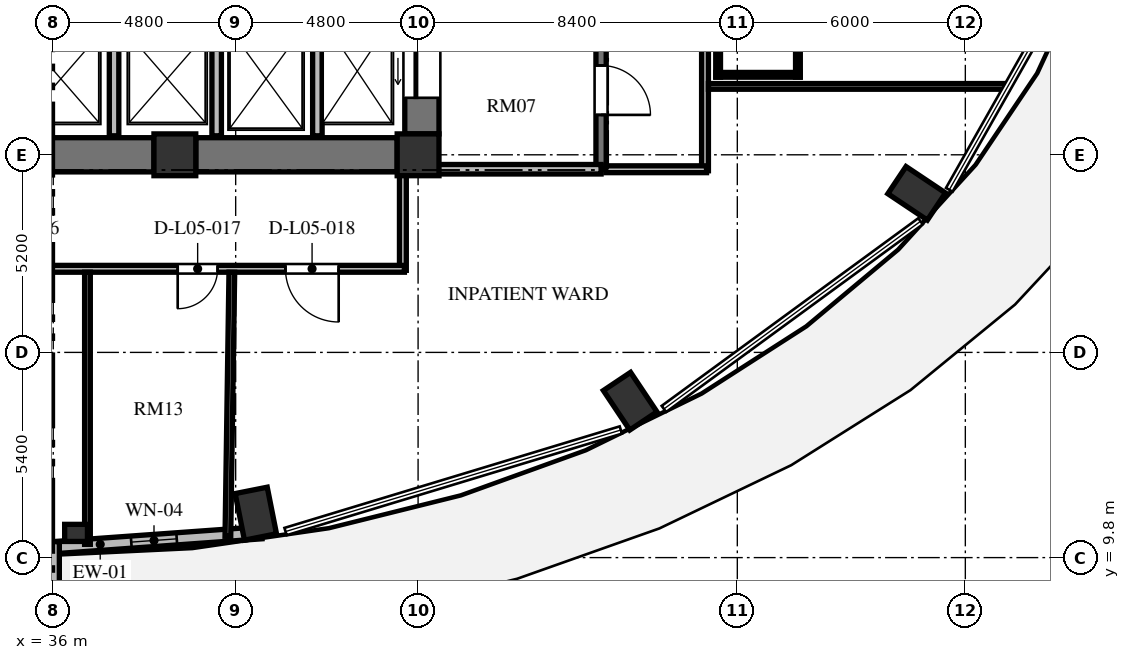
"""IFC4 building model, lengths in metres.
Left out: names, types, materials, properties, quantities, classifications, styles, units other than length and angle.
Written with IfcOpenShell. Run it as: python <this file> out.ifc"""

import sys

from ifc_helpers import new_model, si_unit, direction, frame, frame_2d, origin, origin_2d, place, context, subcontext, project, spatial, rectangle, extrude, element, fill, save


model = new_model("IFC4")
c1 = context("Model", 3, precision=1e-05, world=origin(), true_north=direction((0.0, 1.0)))
c2 = subcontext(c1, "Body", "Model", "MODEL_VIEW")
j1 = project(units=[si_unit("LENGTHUNIT", "METRE"), si_unit("PLANEANGLEUNIT", "RADIAN")], contexts=[c1])
p1 = place(None, origin())
s1 = spatial("IfcSite", under=j1, at=p1, CompositionType="ELEMENT")
p2 = place(p1, origin())
s2 = spatial("IfcBuilding", under=s1, at=p2, CompositionType="ELEMENT")
p3 = place(p2, frame((0.0, 0.0, 25.2)))
s3 = spatial("IfcBuildingStorey", under=s2, at=p3, CompositionType="ELEMENT", Elevation=25.2)
for number, where, z_axis, x_axis in (
    (1, (41.331, 10.956, 0.0), (0.0, 0.0, 1.0), (0.195, -0.981, 0.0)),
    (2, (51.181, 13.916, 0.0), (0.0, 0.0, 1.0), (0.556, -0.831, 0.0)),
    (3, (58.72, 19.386, 0.0), (0.0, 0.0, 1.0), (0.831, -0.556, 0.0)),
):
    element("IfcColumn", number, at=place(p3, frame(where, z_axis=z_axis, x_axis=x_axis)), inside=s3, PredefinedType="COLUMN", context=c2, shape_type="SweptSolid", body=[
        extrude(rectangle(XDim=1.25, YDim=0.86, at=origin_2d()), origin(), (0.0, 0.0, 1.0), 3.648),
    ])
for number, where, z_axis, x_axis in (
    (4, (39.2, 20.4, 0.0), (0.0, 0.0, 1.0), (1.0, 0.0, 0.0)),
    (5, (45.6, 20.4, 0.0), (0.0, 0.0, 1.0), (1.0, 0.0, 0.0)),
):
    element("IfcColumn", number, at=place(p3, frame(where, z_axis=z_axis, x_axis=x_axis)), inside=s3, PredefinedType="COLUMN", context=c2, shape_type="SweptSolid", body=[
        extrude(rectangle(XDim=1.1, YDim=1.1, at=origin_2d()), origin(), (0.0, 0.0, 1.0), 3.648),
    ])
p4 = place(p3, frame((36.6, 10.45, 0.0), z_axis=(0.0, 0.0, 1.0), x_axis=(1.0, 0.0, 0.0)))
e6 = element("IfcColumn", 6, at=p4, inside=s3, PredefinedType="PILASTER", context=c2, shape_type="SweptSolid", body=[
    extrude(rectangle(XDim=0.6, YDim=0.45, at=origin_2d()), origin(), (0.0, 0.0, 1.0), 3.648),
])
p5 = place(p3, frame((45.7, 20.95, 0.0), z_axis=(0.0, 0.0, 1.0), x_axis=(0.0, 1.0, 0.0)))
e7 = element("IfcWall", 7, at=p5, inside=s3, PredefinedType="SHEAR", context=c2, shape_type="SweptSolid", body=[
    extrude(rectangle(XDim=14.1, YDim=0.9, at=frame_2d((7.05, 0.0))), origin(), (0.0, 0.0, 1.0), 3.648),
])
p6 = place(p5, frame((11.75, 0.0, 0.0)))
e8 = element("IfcOpeningElement", 8, at=p6, cuts=e7, PredefinedType="OPENING", context=c2, shape_type="SweptSolid", body=[
    extrude(rectangle(XDim=1.4, YDim=2.3, at=frame_2d((0.7, 1.15))), frame((0.0, 0.46, 0.0), z_axis=(0.0, -1.0, 0.0), x_axis=(1.0, 0.0, 0.0)), (0.0, 0.0, 1.0), 0.92),
])
p7 = place(p5, frame((0.95, 0.0, 0.0)))
e9 = element("IfcOpeningElement", 9, at=p7, cuts=e7, PredefinedType="OPENING", context=c2, shape_type="SweptSolid", body=[
    extrude(rectangle(XDim=1.4, YDim=2.3, at=frame_2d((0.7, 1.15))), frame((0.0, 0.46, 0.0), z_axis=(0.0, -1.0, 0.0), x_axis=(1.0, 0.0, 0.0)), (0.0, 0.0, 1.0), 0.92),
])
p8 = place(p3, frame((33.35, 20.4, 0.0), z_axis=(0.0, 0.0, 1.0), x_axis=(1.0, 0.0, 0.0)))
e10 = element("IfcWall", 10, at=p8, inside=s3, PredefinedType="SHEAR", context=c2, shape_type="SweptSolid", body=[
    extrude(rectangle(XDim=5.3, YDim=0.9, at=frame_2d((2.65, 0.0))), origin(), (0.0, 0.0, 1.0), 3.648),
])
p9 = place(p3, frame((39.75, 20.4, 0.0), z_axis=(0.0, 0.0, 1.0), x_axis=(1.0, 0.0, 0.0)))
e11 = element("IfcWall", 11, at=p9, inside=s3, PredefinedType="SHEAR", context=c2, shape_type="SweptSolid", body=[
    extrude(rectangle(XDim=5.3, YDim=0.9, at=frame_2d((2.65, 0.0))), origin(), (0.0, 0.0, 1.0), 3.648),
])
p10 = place(p3, frame((35.821, 10.047, 0.0), z_axis=(0.0, 0.0, 1.0), x_axis=(0.997422321809, 0.071754525696, 0.0)))
e12 = element("IfcWall", 12, at=p10, inside=s3, PredefinedType="SOLIDWALL", context=c2, shape_type="SweptSolid", body=[
    extrude(rectangle(XDim=5.675, YDim=0.32, at=frame_2d((2.838, 0.0))), origin(), (0.0, 0.0, 1.0), 3.428),
])
p11 = place(p10, frame((2.238, 0.0, 0.85)))
e13 = element("IfcOpeningElement", 13, at=p11, cuts=e12, PredefinedType="OPENING", context=c2, shape_type="SweptSolid", body=[
    extrude(rectangle(XDim=1.2, YDim=1.8, at=frame_2d((0.6, 0.9))), frame((0.0, 0.17, 0.0), z_axis=(0.0, -1.0, 0.0), x_axis=(1.0, 0.0, 0.0)), (0.0, 0.0, 1.0), 0.34),
])
p12 = place(p3, frame((36.0, 5.1, 0.0), z_axis=(0.0, 0.0, 1.0), x_axis=(0.0, 1.0, 0.0)))
e14 = element("IfcWall", 14, at=p12, inside=s3, PredefinedType="SOLIDWALL", context=c2, shape_type="SweptSolid", body=[
    extrude(rectangle(XDim=5.12, YDim=0.32, at=frame_2d((2.56, 0.0))), origin(), (0.0, 0.0, 1.0), 3.428),
])
p13 = place(p12, frame((1.36, 0.0, 0.84)))
e15 = element("IfcOpeningElement", 15, at=p13, cuts=e14, PredefinedType="OPENING", context=c2, shape_type="SweptSolid", body=[
    extrude(rectangle(XDim=2.4, YDim=2.04, at=frame_2d((1.2, 1.02))), frame((0.0, 0.17, 0.0), z_axis=(0.0, -1.0, 0.0), x_axis=(1.0, 0.0, 0.0)), (0.0, 0.0, 1.0), 0.34),
])
p14 = place(p3, frame((42.95, 20.9, 0.0), z_axis=(0.0, 0.0, 1.0), x_axis=(0.0, 1.0, 0.0)))
e16 = element("IfcWall", 16, at=p14, inside=s3, PredefinedType="SOLIDWALL", context=c2, shape_type="SweptSolid", body=[
    extrude(rectangle(XDim=3.2, YDim=0.25, at=frame_2d((1.6, 0.0))), origin(), (0.0, 0.0, 1.0), 3.428),
])
for number, where, z_axis, x_axis in (
    (17, (37.6, 20.9, 0.0), (0.0, 0.0, 1.0), (0.0, 1.0, 0.0)),
    (18, (40.3, 20.9, 0.0), (0.0, 0.0, 1.0), (0.0, 1.0, 0.0)),
):
    element("IfcWall", number, at=place(p3, frame(where, z_axis=z_axis, x_axis=x_axis)), inside=s3, PredefinedType="SOLIDWALL", context=c2, shape_type="SweptSolid", body=[
        extrude(rectangle(XDim=2.8, YDim=0.25, at=frame_2d((1.4, 0.0))), origin(), (0.0, 0.0, 1.0), 3.428),
    ])
p15 = place(p3, frame((50.415, 35.845, 0.0), z_axis=(0.0, 0.0, 1.0), x_axis=(0.0, -1.0, 0.0)))
e19 = element("IfcWall", 19, at=p15, inside=s3, PredefinedType="SHEAR", context=c2, shape_type="SweptSolid", body=[
    extrude(rectangle(XDim=15.825, YDim=0.27, at=frame_2d((7.913, 0.0))), origin(), (0.0, 0.0, 1.0), 3.648),
])
p16 = place(p15, frame((4.445, 0.0, 0.0)))
e20 = element("IfcOpeningElement", 20, at=p16, cuts=e19, PredefinedType="OPENING", context=c2, shape_type="SweptSolid", body=[
    extrude(rectangle(XDim=1.2, YDim=2.15, at=frame_2d((0.6, 1.075))), frame((0.0, 0.145, 0.0), z_axis=(0.0, -1.0, 0.0), x_axis=(1.0, 0.0, 0.0)), (0.0, 0.0, 1.0), 0.29),
])
p17 = place(p15, frame((1.295, 0.0, 0.0)))
e21 = element("IfcOpeningElement", 21, at=p17, cuts=e19, PredefinedType="OPENING", context=c2, shape_type="SweptSolid", body=[
    extrude(rectangle(XDim=1.3, YDim=2.2, at=frame_2d((0.65, 1.1))), frame((0.0, 0.145, 0.0), z_axis=(0.0, -1.0, 0.0), x_axis=(1.0, 0.0, 0.0)), (0.0, 0.0, 1.0), 0.29),
])
p18 = place(p15, frame((13.095, 0.0, 0.0)))
e22 = element("IfcOpeningElement", 22, at=p18, cuts=e19, PredefinedType="OPENING", context=c2, shape_type="SweptSolid", body=[
    extrude(rectangle(XDim=1.3, YDim=2.2, at=frame_2d((0.65, 1.1))), frame((0.0, 0.145, 0.0), z_axis=(0.0, -1.0, 0.0), x_axis=(1.0, 0.0, 0.0)), (0.0, 0.0, 1.0), 0.29),
])
p19 = place(p3, frame((45.7, 20.02, 0.0), z_axis=(0.0, 0.0, 1.0), x_axis=(1.0, 0.0, 0.0)))
e23 = element("IfcWall", 23, at=p19, inside=s3, PredefinedType="SOLIDWALL", context=c2, shape_type="SweptSolid", body=[
    extrude(rectangle(XDim=4.715, YDim=0.25, at=frame_2d((2.357, 0.0))), origin(), (0.0, 0.0, 1.0), 2.813),
])
p20 = place(p3, frame((53.15, 26.64, 0.0), z_axis=(0.0, 0.0, 1.0), x_axis=(0.0, -1.0, 0.0)))
e24 = element("IfcWall", 24, at=p20, inside=s3, PredefinedType="PARTITIONING", context=c2, shape_type="SweptSolid", body=[
    extrude(rectangle(XDim=6.66, YDim=0.18, at=frame_2d((3.33, 0.0))), origin(), (0.0, 0.0, 1.0), 3.428),
])
p21 = place(p3, frame((53.19, 20.02, 0.0), z_axis=(0.0, 0.0, 1.0), x_axis=(-1.0, 0.0, 0.0)))
e25 = element("IfcWall", 25, at=p21, inside=s3, PredefinedType="PARTITIONING", context=c2, shape_type="SweptSolid", body=[
    extrude(rectangle(XDim=2.65, YDim=0.18, at=frame_2d((1.325, 0.0))), origin(), (0.0, 0.0, 1.0), 2.813),
])
p22 = place(p3, frame((45.2, 19.91, 0.0), z_axis=(0.0, 0.0, 1.0), x_axis=(0.0, -1.0, 0.0)))
e26 = element("IfcWall", 26, at=p22, inside=s3, PredefinedType="PARTITIONING", context=c2, shape_type="SweptSolid", body=[
    extrude(rectangle(XDim=2.55, YDim=0.18, at=frame_2d((1.275, 0.0))), origin(), (0.0, 0.0, 1.0), 3.428),
])
p23 = place(p3, frame((45.24, 17.4, 0.0), z_axis=(0.0, 0.0, 1.0), x_axis=(-1.0, 0.0, 0.0)))
e27 = element("IfcWall", 27, at=p23, inside=s3, PredefinedType="PARTITIONING", context=c2, shape_type="SweptSolid", body=[
    extrude(rectangle(XDim=21.93, YDim=0.18, at=frame_2d((10.965, 0.0))), origin(), (0.0, 0.0, 1.0), 3.053),
])
p24 = place(p23, frame((18.076, 0.0, 0.0)))
e28 = element("IfcOpeningElement", 28, at=p24, cuts=e27, PredefinedType="OPENING", context=c2, shape_type="SweptSolid", body=[
    extrude(rectangle(XDim=1.4, YDim=2.2, at=frame_2d((0.7, 1.1))), frame((0.0, 0.1, 0.0), z_axis=(0.0, -1.0, 0.0), x_axis=(1.0, 0.0, 0.0)), (0.0, 0.0, 1.0), 0.2),
])
p25 = place(p23, frame((13.34, 0.0, 0.0)))
e29 = element("IfcOpeningElement", 29, at=p25, cuts=e27, PredefinedType="OPENING", context=c2, shape_type="SweptSolid", body=[
    extrude(rectangle(XDim=1.4, YDim=2.2, at=frame_2d((0.7, 1.1))), frame((0.0, 0.1, 0.0), z_axis=(0.0, -1.0, 0.0), x_axis=(1.0, 0.0, 0.0)), (0.0, 0.0, 1.0), 0.2),
])
p26 = place(p23, frame((9.715, 0.0, 0.0)))
e30 = element("IfcOpeningElement", 30, at=p26, cuts=e27, PredefinedType="OPENING", context=c2, shape_type="SweptSolid", body=[
    extrude(rectangle(XDim=1.05, YDim=2.15, at=frame_2d((0.525, 1.075))), frame((0.0, 0.1, 0.0), z_axis=(0.0, -1.0, 0.0), x_axis=(1.0, 0.0, 0.0)), (0.0, 0.0, 1.0), 0.2),
])
p27 = place(p23, frame((4.916, 0.0, 0.0)))
e31 = element("IfcOpeningElement", 31, at=p27, cuts=e27, PredefinedType="OPENING", context=c2, shape_type="SweptSolid", body=[
    extrude(rectangle(XDim=1.05, YDim=2.15, at=frame_2d((0.525, 1.075))), frame((0.0, 0.1, 0.0), z_axis=(0.0, -1.0, 0.0), x_axis=(1.0, 0.0, 0.0)), (0.0, 0.0, 1.0), 0.2),
])
p28 = place(p23, frame((1.729, 0.0, 0.0)))
e32 = element("IfcOpeningElement", 32, at=p28, cuts=e27, PredefinedType="OPENING", context=c2, shape_type="SweptSolid", body=[
    extrude(rectangle(XDim=1.4, YDim=2.2, at=frame_2d((0.7, 1.1))), frame((0.0, 0.1, 0.0), z_axis=(0.0, -1.0, 0.0), x_axis=(1.0, 0.0, 0.0)), (0.0, 0.0, 1.0), 0.2),
])
p29 = place(p3, frame((53.24, 22.2, 0.0), z_axis=(0.0, 0.0, 1.0), x_axis=(1.0, 0.0, 0.0)))
e33 = element("IfcWall", 33, at=p29, inside=s3, PredefinedType="PARTITIONING", context=c2, shape_type="SweptSolid", body=[
    extrude(rectangle(XDim=7.875, YDim=0.15, at=frame_2d((3.938, 0.0))), origin(), (0.0, 0.0, 1.0), 3.428),
])
p30 = place(p3, frame((36.9, 10.15, 0.0), z_axis=(0.0, 0.0, 1.0), x_axis=(0.0, 1.0, 0.0)))
e34 = element("IfcWall", 34, at=p30, inside=s3, PredefinedType="PARTITIONING", context=c2, shape_type="SweptSolid", body=[
    extrude(rectangle(XDim=7.16, YDim=0.15, at=frame_2d((3.58, 0.0))), origin(), (0.0, 0.0, 1.0), 3.428),
])
p31 = place(p3, frame((40.595, 10.359, 0.0), z_axis=(0.0, 0.0, 1.0), x_axis=(0.014960393547, 0.99988808705, 0.0)))
e35 = element("IfcWall", 35, at=p31, inside=s3, PredefinedType="PARTITIONING", context=c2, shape_type="SweptSolid", body=[
    extrude(rectangle(XDim=6.952, YDim=0.15, at=frame_2d((3.476, 0.0))), origin(), (0.0, 0.0, 1.0), 2.813),
])
p32 = place(p3, frame((53.435, 22.505, 0.0), z_axis=(0.0, 0.0, 1.0), x_axis=(1.0, 0.0, 0.0)))
e36 = element("IfcWall", 36, at=p32, inside=s3, PredefinedType="PARTITIONING", context=c2, shape_type="SweptSolid", body=[
    extrude(rectangle(XDim=2.22, YDim=0.125, at=frame_2d((1.11, 0.0))), origin(), (0.0, 0.0, 1.0), 3.428),
])
for number, where, z_axis, x_axis in (
    (37, (55.595, 22.445, 0.0), (0.0, 0.0, 1.0), (0.0, 1.0, 0.0)),
    (38, (53.495, 22.445, 0.0), (0.0, 0.0, 1.0), (0.0, 1.0, 0.0)),
):
    element("IfcWall", number, at=place(p3, frame(where, z_axis=z_axis, x_axis=x_axis)), inside=s3, PredefinedType="PARTITIONING", context=c2, shape_type="SweptSolid", body=[
        extrude(rectangle(XDim=2.28, YDim=0.125, at=frame_2d((1.14, 0.0))), origin(), (0.0, 0.0, 1.0), 3.428),
    ])
p33 = place(p11, origin())
e39 = element("IfcWindow", 39, at=p33, inside=s3, PartitioningType="SINGLE_PANEL", PredefinedType="WINDOW", context=c2, shape_type="SweptSolid", body=[
    extrude(rectangle(XDim=1.2, YDim=1.8, at=frame_2d((0.6, 0.9))), frame((0.0, 0.03, 0.0), z_axis=(0.0, -1.0, 0.0), x_axis=(1.0, 0.0, 0.0)), (0.0, 0.0, 1.0), 0.06),
])
fill(e13, e39)
p34 = place(p7, origin())
e40 = element("IfcDoor", 40, at=p34, inside=s3, OperationType="SLIDING_TO_LEFT", PredefinedType="DOOR", context=c2, shape_type="SweptSolid", body=[
    extrude(rectangle(XDim=1.4, YDim=2.3, at=frame_2d((0.7, 1.15))), frame((0.0, 0.025, 0.0), z_axis=(0.0, -1.0, 0.0), x_axis=(1.0, 0.0, 0.0)), (0.0, 0.0, 1.0), 0.05),
])
fill(e9, e40)
p35 = place(p18, origin())
e41 = element("IfcDoor", 41, at=p35, inside=s3, OperationType="SINGLE_SWING_RIGHT", PredefinedType="DOOR", context=c2, shape_type="SweptSolid", body=[
    extrude(rectangle(XDim=1.3, YDim=2.2, at=frame_2d((0.65, 1.1))), frame((0.0, 0.025, 0.0), z_axis=(0.0, -1.0, 0.0), x_axis=(1.0, 0.0, 0.0)), (0.0, 0.0, 1.0), 0.05),
])
fill(e22, e41)
p36 = place(p27, origin())
e42 = element("IfcDoor", 42, at=p36, inside=s3, OperationType="SINGLE_SWING_RIGHT", PredefinedType="DOOR", context=c2, shape_type="SweptSolid", body=[
    extrude(rectangle(XDim=1.05, YDim=2.15, at=frame_2d((0.525, 1.075))), frame((0.0, 0.025, 0.0), z_axis=(0.0, -1.0, 0.0), x_axis=(1.0, 0.0, 0.0)), (0.0, 0.0, 1.0), 0.05),
])
fill(e31, e42)
p37 = place(p28, origin())
e43 = element("IfcDoor", 43, at=p37, inside=s3, OperationType="SINGLE_SWING_LEFT", PredefinedType="DOOR", context=c2, shape_type="SweptSolid", body=[
    extrude(rectangle(XDim=1.4, YDim=2.2, at=frame_2d((0.7, 1.1))), frame((0.0, 0.025, 0.0), z_axis=(0.0, -1.0, 0.0), x_axis=(1.0, 0.0, 0.0)), (0.0, 0.0, 1.0), 0.05),
])
fill(e32, e43)
save(model, sys.argv[1])
